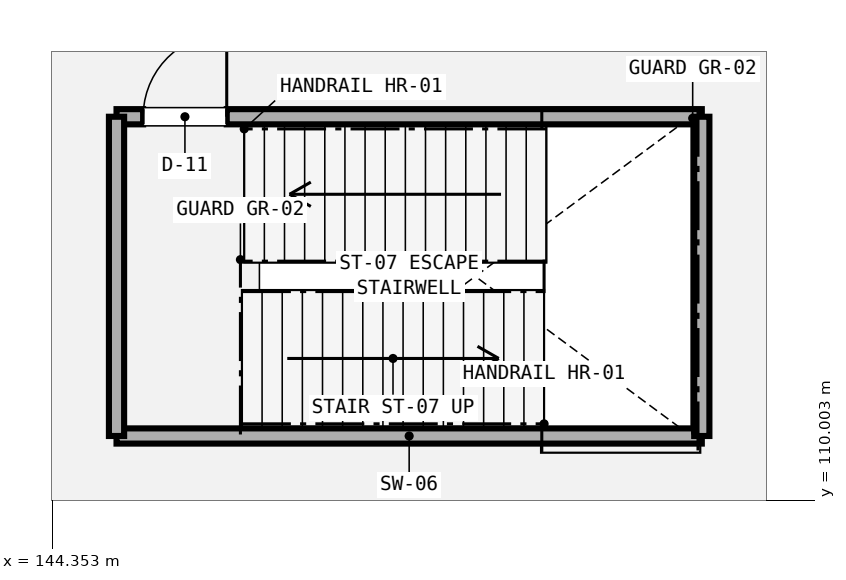
"""IFC4 building model, lengths in metres.
Left out: names, types, materials, properties, quantities, classifications, styles, units other than length and angle.
Written with IfcOpenShell. Run it as: python <this file> out.ifc"""

import sys

from ifc_helpers import new_model, si_unit, direction, frame, frame_2d, origin, place, context, subcontext, project, spatial, rectangle, extrude, element, fill, save


model = new_model("IFC4")
c1 = context("Model", 3, precision=1e-05, world=origin(), true_north=direction((0.0, 1.0)))
c2 = subcontext(c1, "Body", "Model", "MODEL_VIEW")
j1 = project(units=[si_unit("LENGTHUNIT", "METRE"), si_unit("PLANEANGLEUNIT", "RADIAN")], contexts=[c1])
p1 = place(None, origin())
s1 = spatial("IfcSite", under=j1, at=p1, CompositionType="ELEMENT")
p2 = place(p1, origin())
s2 = spatial("IfcBuilding", under=s1, at=p2, CompositionType="ELEMENT")
p3 = place(p2, origin())
s3 = spatial("IfcBuildingStorey", under=s2, at=p3, CompositionType="ELEMENT", Elevation=0.0)
p4 = place(p3, frame((145.2, 110.85, 0.0), z_axis=(0.0, 0.0, 1.0), x_axis=(1.0, 0.0, 0.0)))
e1 = element("IfcWall", 1, at=p4, inside=s3, PredefinedType="SHEAR", context=c2, shape_type="SweptSolid", body=[
    extrude(rectangle(XDim=7.7, YDim=0.2, at=frame_2d((3.85, 0.0))), origin(), (0.0, 0.0, 1.0), 5.08),
])
p5 = place(p3, frame((145.2, 115.05, 0.0), z_axis=(0.0, 0.0, 1.0), x_axis=(1.0, 0.0, 0.0)))
e2 = element("IfcWall", 2, at=p5, inside=s3, PredefinedType="SHEAR", context=c2, shape_type="SweptSolid", body=[
    extrude(rectangle(XDim=7.7, YDim=0.2, at=frame_2d((3.85, 0.0))), origin(), (0.0, 0.0, 1.0), 5.08),
])
p6 = place(p5, frame((0.35, 0.0, 0.0)))
e3 = element("IfcOpeningElement", 3, at=p6, cuts=e2, PredefinedType="OPENING", context=c2, shape_type="SweptSolid", body=[
    extrude(rectangle(XDim=1.1, YDim=2.2, at=frame_2d((0.55, 1.1))), frame((0.0, 0.11, 0.0), z_axis=(0.0, -1.0, 0.0), x_axis=(1.0, 0.0, 0.0)), (0.0, 0.0, 1.0), 0.22),
])
for number, where, z_axis, x_axis in (
    (4, (145.2, 110.85, 0.0), (0.0, 0.0, 1.0), (0.0, 1.0, 0.0)),
    (5, (152.9, 110.85, 0.0), (0.0, 0.0, 1.0), (0.0, 1.0, 0.0)),
):
    element("IfcWall", number, at=place(p3, frame(where, z_axis=z_axis, x_axis=x_axis)), inside=s3, PredefinedType="SHEAR", context=c2, shape_type="SweptSolid", body=[
        extrude(rectangle(XDim=4.2, YDim=0.2, at=frame_2d((2.1, 0.0))), origin(), (0.0, 0.0, 1.0), 5.08),
    ])
p7 = place(p6, origin())
e6 = element("IfcDoor", 6, at=p7, inside=s3, OperationType="SINGLE_SWING_RIGHT", PredefinedType="DOOR", context=c2, shape_type="SweptSolid", body=[
    extrude(rectangle(XDim=1.1, YDim=2.2, at=frame_2d((0.55, 1.1))), frame((0.0, 0.025, 0.0), z_axis=(0.0, -1.0, 0.0), x_axis=(1.0, 0.0, 0.0)), (0.0, 0.0, 1.0), 0.05),
])
fill(e3, e6)
save(model, sys.argv[1])
